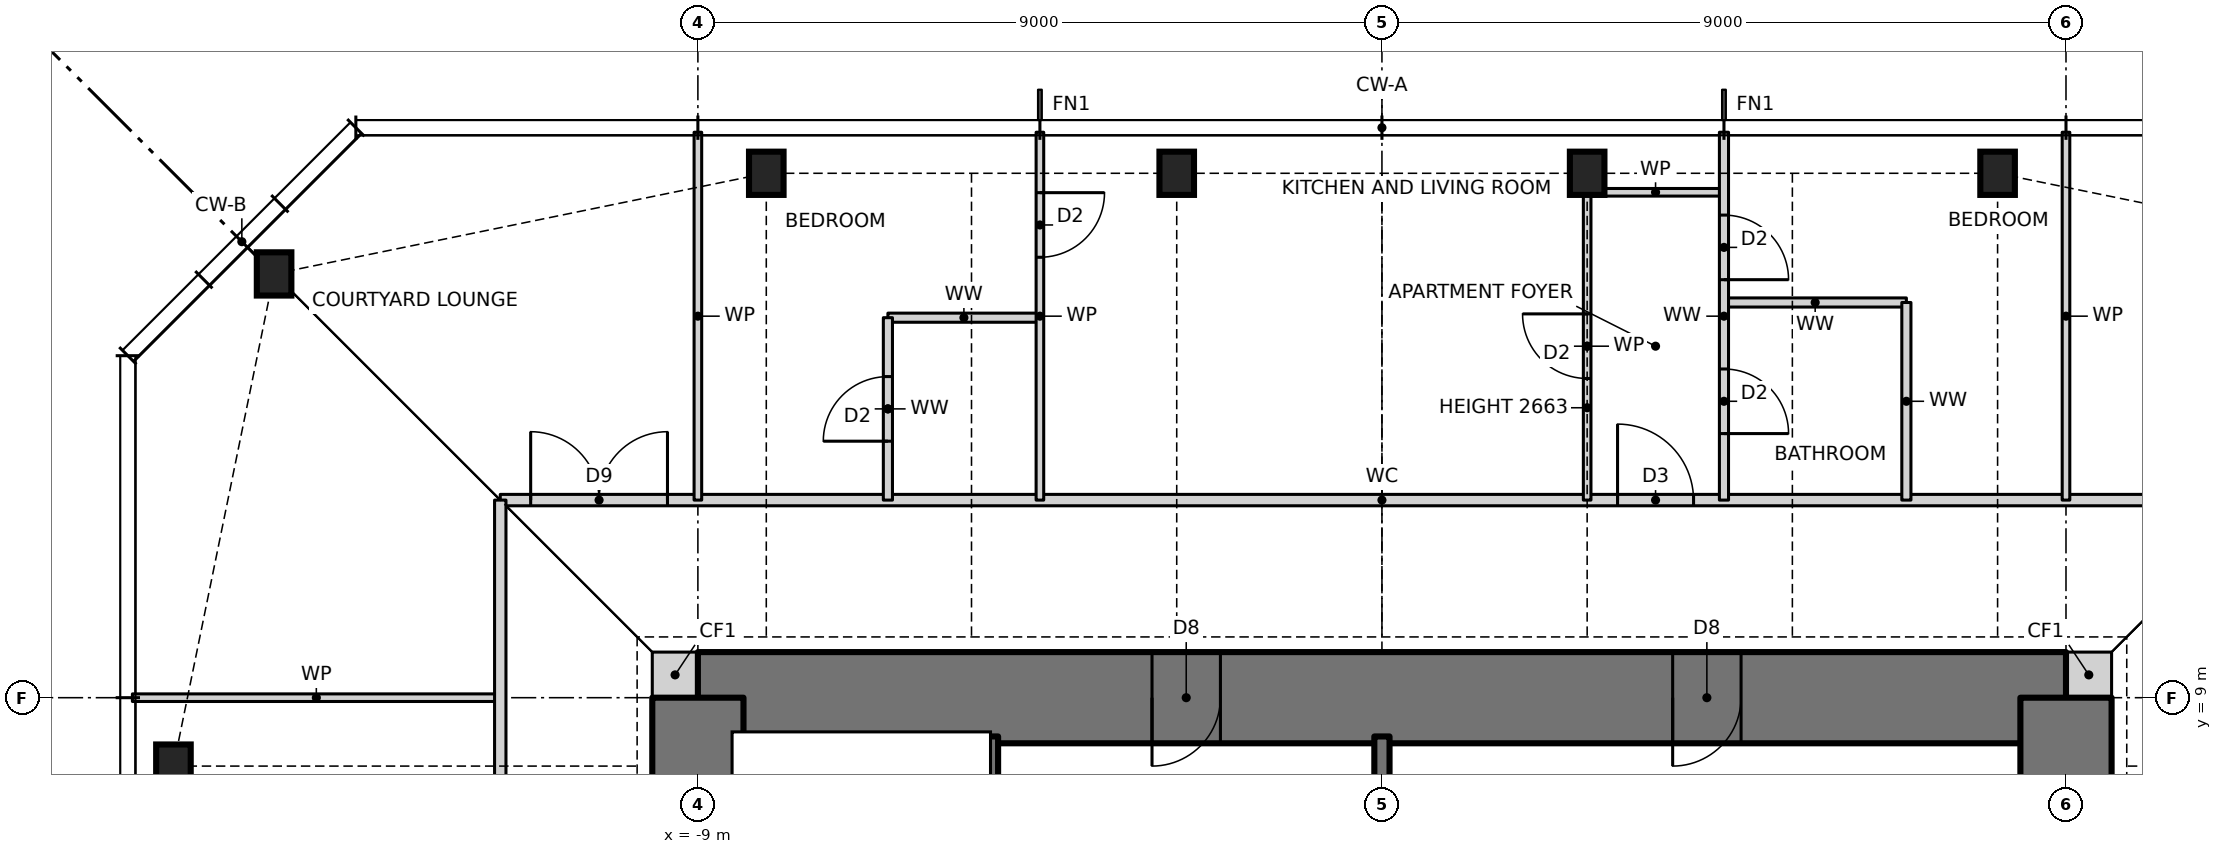
"""IFC4 building model, lengths in metres.
Left out: names, types, materials, properties, quantities, classifications, styles, units other than length and angle.
Written with IfcOpenShell. Run it as: python <this file> out.ifc"""

import sys

from ifc_helpers import new_model, si_unit, direction, frame, frame_2d, origin, origin_2d, place, context, subcontext, project, spatial, rectangle, i_section, extrude, element, fill, save


model = new_model("IFC4")
c1 = context("Model", 3, precision=1e-05, world=origin(), true_north=direction((0.0, 1.0)))
c2 = subcontext(c1, "Body", "Model", "MODEL_VIEW")
j1 = project(units=[si_unit("LENGTHUNIT", "METRE"), si_unit("PLANEANGLEUNIT", "RADIAN")], contexts=[c1])
p1 = place(None, origin())
s1 = spatial("IfcSite", under=j1, at=p1, CompositionType="ELEMENT")
p2 = place(p1, origin())
s2 = spatial("IfcBuilding", under=s1, at=p2, CompositionType="ELEMENT")
p3 = place(p2, frame((0.0, 0.0, 243.0)))
s3 = spatial("IfcBuildingStorey", under=s2, at=p3, CompositionType="ELEMENT", Elevation=243.0)
for number, where, z_axis, x_axis in (
    (1, (8.1, 15.9, 0.0), (0.0, 0.0, 1.0), (1.0, 0.0, 0.0)),
    (2, (2.7, 15.9, 0.0), (0.0, 0.0, 1.0), (1.0, 0.0, 0.0)),
    (3, (-2.7, 15.9, 0.0), (0.0, 0.0, 1.0), (1.0, 0.0, 0.0)),
    (4, (-8.1, 15.9, 0.0), (0.0, 0.0, 1.0), (1.0, 0.0, 0.0)),
    (5, (-14.576, 14.576, 0.0), (0.0, 0.0, 1.0), (1.0, 0.0, 0.0)),
    (6, (-15.9, 8.1, 0.0), (0.0, 0.0, 1.0), (1.0, 0.0, 0.0)),
):
    element("IfcColumn", number, at=place(p3, frame(where, z_axis=z_axis, x_axis=x_axis)), inside=s3, PredefinedType="COLUMN", context=c2, shape_type="SweptSolid", body=[
        extrude(i_section(OverallWidth=0.455, OverallDepth=0.569, WebThickness=0.078, FlangeThickness=0.125, at=origin_2d()), origin(), (0.0, 0.0, 1.0), 3.5),
    ])
for number, where, z_axis, x_axis in (
    (7, (9.0, 9.3, 0.0), (0.0, 0.0, 1.0), (1.0, 0.0, 0.0)),
    (8, (-9.6, 9.3, 0.0), (0.0, 0.0, 1.0), (1.0, 0.0, 0.0)),
):
    element("IfcWall", number, at=place(p3, frame(where, z_axis=z_axis, x_axis=x_axis)), inside=s3, PredefinedType="SOLIDWALL", context=c2, shape_type="SweptSolid", body=[
        extrude(rectangle(XDim=0.6, YDim=0.6, at=frame_2d((0.3, 0.0))), origin(), (0.0, 0.0, 1.0), 3.5),
    ])
p4 = place(p3, frame((9.0, 9.0, 0.0), z_axis=(0.0, 0.0, 1.0), x_axis=(-1.0, 0.0, 0.0)))
e9 = element("IfcWall", 9, at=p4, inside=s3, PredefinedType="SHEAR", context=c2, shape_type="SweptSolid", body=[
    extrude(rectangle(XDim=18.0, YDim=1.2, at=frame_2d((9.0, 0.0))), origin(), (0.0, 0.0, 1.0), 3.5),
])
p5 = place(p4, frame((11.125, 0.0, 0.0)))
e10 = element("IfcOpeningElement", 10, at=p5, cuts=e9, PredefinedType="OPENING", context=c2, shape_type="SweptSolid", body=[
    extrude(rectangle(XDim=0.9, YDim=2.1, at=frame_2d((0.45, 1.05))), frame((0.0, 0.61, 0.0), z_axis=(0.0, -1.0, 0.0), x_axis=(1.0, 0.0, 0.0)), (0.0, 0.0, 1.0), 1.22),
])
p6 = place(p4, frame((4.275, 0.0, 0.0)))
e11 = element("IfcOpeningElement", 11, at=p6, cuts=e9, PredefinedType="OPENING", context=c2, shape_type="SweptSolid", body=[
    extrude(rectangle(XDim=0.9, YDim=2.1, at=frame_2d((0.45, 1.05))), frame((0.0, 0.61, 0.0), z_axis=(0.0, -1.0, 0.0), x_axis=(1.0, 0.0, 0.0)), (0.0, 0.0, 1.0), 1.22),
])
p7 = place(p3, frame((9.0, -9.0, 0.0), z_axis=(0.0, 0.0, 1.0), x_axis=(0.0, 1.0, 0.0)))
e12 = element("IfcWall", 12, at=p7, inside=s3, PredefinedType="SHEAR", context=c2, shape_type="SweptSolid", body=[
    extrude(rectangle(XDim=18.0, YDim=1.2, at=frame_2d((9.0, 0.0))), origin(), (0.0, 0.0, 1.0), 3.5),
])
p8 = place(p7, frame((8.5, 0.0, 0.0)))
e13 = element("IfcOpeningElement", 13, at=p8, cuts=e12, PredefinedType="OPENING", context=c2, shape_type="SweptSolid", body=[
    extrude(rectangle(XDim=1.0, YDim=2.1, at=frame_2d((0.5, 1.05))), frame((0.0, 0.61, 0.0), z_axis=(0.0, -1.0, 0.0), x_axis=(1.0, 0.0, 0.0)), (0.0, 0.0, 1.0), 1.22),
])
p9 = place(p3, frame((-9.0, 9.0, 0.0), z_axis=(0.0, 0.0, 1.0), x_axis=(0.0, -1.0, 0.0)))
e14 = element("IfcWall", 14, at=p9, inside=s3, PredefinedType="SHEAR", context=c2, shape_type="SweptSolid", body=[
    extrude(rectangle(XDim=18.0, YDim=1.2, at=frame_2d((9.0, 0.0))), origin(), (0.0, 0.0, 1.0), 3.5),
])
p10 = place(p9, frame((8.5, 0.0, 0.0)))
e15 = element("IfcOpeningElement", 15, at=p10, cuts=e14, PredefinedType="OPENING", context=c2, shape_type="SweptSolid", body=[
    extrude(rectangle(XDim=1.0, YDim=2.1, at=frame_2d((0.5, 1.05))), frame((0.0, 0.61, 0.0), z_axis=(0.0, -1.0, 0.0), x_axis=(1.0, 0.0, 0.0)), (0.0, 0.0, 1.0), 1.22),
])
p11 = place(p3, frame((-16.44, 9.0, 0.0), z_axis=(0.0, 0.0, 1.0), x_axis=(1.0, 0.0, 0.0)))
e16 = element("IfcWall", 16, at=p11, inside=s3, PredefinedType="PARTITIONING", context=c2, shape_type="SweptSolid", body=[
    extrude(rectangle(XDim=4.84, YDim=0.1, at=frame_2d((2.42, 0.0))), origin(), (0.0, 0.0, 1.0), 3.27),
])
p12 = place(p3, frame((-11.6, 11.6, 0.0), z_axis=(0.0, 0.0, 1.0), x_axis=(1.0, 0.0, 0.0)))
e17 = element("IfcWall", 17, at=p12, inside=s3, PredefinedType="PARTITIONING", context=c2, shape_type="SweptSolid", body=[
    extrude(rectangle(XDim=23.2, YDim=0.15, at=frame_2d((11.6, 0.0))), origin(), (0.0, 0.0, 1.0), 3.27),
])
p13 = place(p12, frame((14.7, 0.0, 0.0)))
e18 = element("IfcOpeningElement", 18, at=p13, cuts=e17, PredefinedType="OPENING", context=c2, shape_type="SweptSolid", body=[
    extrude(rectangle(XDim=1.0, YDim=2.1, at=frame_2d((0.5, 1.05))), frame((0.0, 0.085, 0.0), z_axis=(0.0, -1.0, 0.0), x_axis=(1.0, 0.0, 0.0)), (0.0, 0.0, 1.0), 0.17),
])
p14 = place(p12, frame((0.4, 0.0, 0.0)))
e19 = element("IfcOpeningElement", 19, at=p14, cuts=e17, PredefinedType="OPENING", context=c2, shape_type="SweptSolid", body=[
    extrude(rectangle(XDim=1.8, YDim=2.1, at=frame_2d((0.9, 1.05))), frame((0.0, 0.085, 0.0), z_axis=(0.0, -1.0, 0.0), x_axis=(1.0, 0.0, 0.0)), (0.0, 0.0, 1.0), 0.17),
])
p15 = place(p3, frame((-6.5, 14.0, 0.0), z_axis=(0.0, 0.0, 1.0), x_axis=(1.0, 0.0, 0.0)))
e20 = element("IfcWall", 20, at=p15, inside=s3, PredefinedType="PARTITIONING", context=c2, shape_type="SweptSolid", body=[
    extrude(rectangle(XDim=2.0, YDim=0.12, at=frame_2d((1.0, 0.0))), origin(), (0.0, 0.0, 1.0), 3.27),
])
p16 = place(p3, frame((4.5, 14.2, 0.0), z_axis=(0.0, 0.0, 1.0), x_axis=(1.0, 0.0, 0.0)))
e21 = element("IfcWall", 21, at=p16, inside=s3, PredefinedType="PARTITIONING", context=c2, shape_type="SweptSolid", body=[
    extrude(rectangle(XDim=2.4, YDim=0.12, at=frame_2d((1.2, 0.0))), origin(), (0.0, 0.0, 1.0), 3.27),
])
p17 = place(p3, frame((2.7, 15.65, 0.0), z_axis=(0.0, 0.0, 1.0), x_axis=(1.0, 0.0, 0.0)))
e22 = element("IfcWall", 22, at=p17, inside=s3, PredefinedType="PARTITIONING", context=c2, shape_type="SweptSolid", body=[
    extrude(rectangle(XDim=1.8, YDim=0.1, at=frame_2d((0.9, 0.0))), origin(), (0.0, 0.0, 1.0), 3.27),
])
p18 = place(p3, frame((9.0, 11.6, 0.0), z_axis=(0.0, 0.0, 1.0), x_axis=(0.0, 1.0, 0.0)))
e23 = element("IfcWall", 23, at=p18, inside=s3, PredefinedType="PARTITIONING", context=c2, shape_type="SweptSolid", body=[
    extrude(rectangle(XDim=4.84, YDim=0.1, at=frame_2d((2.42, 0.0))), origin(), (0.0, 0.0, 1.0), 3.27),
])
p19 = place(p3, frame((6.9, 11.6, 0.0), z_axis=(0.0, 0.0, 1.0), x_axis=(0.0, 1.0, 0.0)))
e24 = element("IfcWall", 24, at=p19, inside=s3, PredefinedType="PARTITIONING", context=c2, shape_type="SweptSolid", body=[
    extrude(rectangle(XDim=2.6, YDim=0.12, at=frame_2d((1.3, 0.0))), origin(), (0.0, 0.0, 1.0), 3.27),
])
p20 = place(p3, frame((4.5, 11.6, 0.0), z_axis=(0.0, 0.0, 1.0), x_axis=(0.0, 1.0, 0.0)))
e25 = element("IfcWall", 25, at=p20, inside=s3, PredefinedType="PARTITIONING", context=c2, shape_type="SweptSolid", body=[
    extrude(rectangle(XDim=4.84, YDim=0.12, at=frame_2d((2.42, 0.0))), origin(), (0.0, 0.0, 1.0), 3.27),
])
p21 = place(p20, frame((2.9, 0.0, 0.0)))
e26 = element("IfcOpeningElement", 26, at=p21, cuts=e25, PredefinedType="OPENING", context=c2, shape_type="SweptSolid", body=[
    extrude(rectangle(XDim=0.85, YDim=2.1, at=frame_2d((0.425, 1.05))), frame((0.0, 0.07, 0.0), z_axis=(0.0, -1.0, 0.0), x_axis=(1.0, 0.0, 0.0)), (0.0, 0.0, 1.0), 0.14),
])
p22 = place(p20, frame((0.875, 0.0, 0.0)))
e27 = element("IfcOpeningElement", 27, at=p22, cuts=e25, PredefinedType="OPENING", context=c2, shape_type="SweptSolid", body=[
    extrude(rectangle(XDim=0.85, YDim=2.1, at=frame_2d((0.425, 1.05))), frame((0.0, 0.07, 0.0), z_axis=(0.0, -1.0, 0.0), x_axis=(1.0, 0.0, 0.0)), (0.0, 0.0, 1.0), 0.14),
])
p23 = place(p3, frame((2.7, 11.6, 0.0), z_axis=(0.0, 0.0, 1.0), x_axis=(0.0, 1.0, 0.0)))
e28 = element("IfcWall", 28, at=p23, inside=s3, PredefinedType="PARTITIONING", context=c2, shape_type="SweptSolid", body=[
    extrude(rectangle(XDim=4.05, YDim=0.1, at=frame_2d((2.025, 0.0))), origin(), (0.0, 0.0, 1.0), 2.663),
])
p24 = place(p23, frame((1.6, 0.0, 0.0)))
e29 = element("IfcOpeningElement", 29, at=p24, cuts=e28, PredefinedType="OPENING", context=c2, shape_type="SweptSolid", body=[
    extrude(rectangle(XDim=0.85, YDim=2.1, at=frame_2d((0.425, 1.05))), frame((0.0, 0.06, 0.0), z_axis=(0.0, -1.0, 0.0), x_axis=(1.0, 0.0, 0.0)), (0.0, 0.0, 1.0), 0.12),
])
p25 = place(p3, frame((0.0, 4.4, 0.0), z_axis=(0.0, 0.0, 1.0), x_axis=(0.0, 1.0, 0.0)))
e30 = element("IfcWall", 30, at=p25, inside=s3, PredefinedType="SOLIDWALL", context=c2, shape_type="SweptSolid", body=[
    extrude(rectangle(XDim=4.09, YDim=0.2, at=frame_2d((2.045, 0.0))), origin(), (0.0, 0.0, 1.0), 3.5),
])
p26 = place(p3, frame((-4.5, 11.6, 0.0), z_axis=(0.0, 0.0, 1.0), x_axis=(0.0, 1.0, 0.0)))
e31 = element("IfcWall", 31, at=p26, inside=s3, PredefinedType="PARTITIONING", context=c2, shape_type="SweptSolid", body=[
    extrude(rectangle(XDim=4.84, YDim=0.1, at=frame_2d((2.42, 0.0))), origin(), (0.0, 0.0, 1.0), 3.27),
])
p27 = place(p26, frame((3.195, 0.0, 0.0)))
e32 = element("IfcOpeningElement", 32, at=p27, cuts=e31, PredefinedType="OPENING", context=c2, shape_type="SweptSolid", body=[
    extrude(rectangle(XDim=0.85, YDim=2.1, at=frame_2d((0.425, 1.05))), frame((0.0, 0.06, 0.0), z_axis=(0.0, -1.0, 0.0), x_axis=(1.0, 0.0, 0.0)), (0.0, 0.0, 1.0), 0.12),
])
p28 = place(p3, frame((-5.15, 1.6, 0.0), z_axis=(0.0, 0.0, 1.0), x_axis=(0.0, 1.0, 0.0)))
e33 = element("IfcWall", 33, at=p28, inside=s3, PredefinedType="SOLIDWALL", context=c2, shape_type="SweptSolid", body=[
    extrude(rectangle(XDim=6.89, YDim=0.2, at=frame_2d((3.445, 0.0))), origin(), (0.0, 0.0, 1.0), 3.5),
])
p29 = place(p3, frame((-6.5, 11.6, 0.0), z_axis=(0.0, 0.0, 1.0), x_axis=(0.0, 1.0, 0.0)))
e34 = element("IfcWall", 34, at=p29, inside=s3, PredefinedType="PARTITIONING", context=c2, shape_type="SweptSolid", body=[
    extrude(rectangle(XDim=2.4, YDim=0.12, at=frame_2d((1.2, 0.0))), origin(), (0.0, 0.0, 1.0), 3.27),
])
p30 = place(p29, frame((0.775, 0.0, 0.0)))
e35 = element("IfcOpeningElement", 35, at=p30, cuts=e34, PredefinedType="OPENING", context=c2, shape_type="SweptSolid", body=[
    extrude(rectangle(XDim=0.85, YDim=2.1, at=frame_2d((0.425, 1.05))), frame((0.0, 0.07, 0.0), z_axis=(0.0, -1.0, 0.0), x_axis=(1.0, 0.0, 0.0)), (0.0, 0.0, 1.0), 0.14),
])
p31 = place(p3, frame((-9.0, 11.6, 0.0), z_axis=(0.0, 0.0, 1.0), x_axis=(0.0, 1.0, 0.0)))
e36 = element("IfcWall", 36, at=p31, inside=s3, PredefinedType="PARTITIONING", context=c2, shape_type="SweptSolid", body=[
    extrude(rectangle(XDim=4.84, YDim=0.1, at=frame_2d((2.42, 0.0))), origin(), (0.0, 0.0, 1.0), 3.27),
])
p32 = place(p3, frame((-11.6, -11.6, 0.0), z_axis=(0.0, 0.0, 1.0), x_axis=(0.0, 1.0, 0.0)))
e37 = element("IfcWall", 37, at=p32, inside=s3, PredefinedType="PARTITIONING", context=c2, shape_type="SweptSolid", body=[
    extrude(rectangle(XDim=23.2, YDim=0.15, at=frame_2d((11.6, 0.0))), origin(), (0.0, 0.0, 1.0), 3.27),
])
p33 = place(p32, frame((14.7, 0.0, 0.0)))
e38 = element("IfcOpeningElement", 38, at=p33, cuts=e37, PredefinedType="OPENING", context=c2, shape_type="SweptSolid", body=[
    extrude(rectangle(XDim=1.0, YDim=2.1, at=frame_2d((0.5, 1.05))), frame((0.0, 0.085, 0.0), z_axis=(0.0, -1.0, 0.0), x_axis=(1.0, 0.0, 0.0)), (0.0, 0.0, 1.0), 0.17),
])
p34 = place(p32, frame((0.875, 0.0, 0.0)))
e39 = element("IfcOpeningElement", 39, at=p34, cuts=e37, PredefinedType="OPENING", context=c2, shape_type="SweptSolid", body=[
    extrude(rectangle(XDim=0.85, YDim=2.1, at=frame_2d((0.425, 1.05))), frame((0.0, 0.085, 0.0), z_axis=(0.0, -1.0, 0.0), x_axis=(1.0, 0.0, 0.0)), (0.0, 0.0, 1.0), 0.17),
])
p35 = place(p13, origin())
e40 = element("IfcDoor", 40, at=p35, inside=s3, OperationType="SINGLE_SWING_LEFT", PredefinedType="DOOR", context=c2, shape_type="SweptSolid", body=[
    extrude(rectangle(XDim=1.0, YDim=2.1, at=frame_2d((0.5, 1.05))), frame((0.0, 0.025, 0.0), z_axis=(0.0, -1.0, 0.0), x_axis=(1.0, 0.0, 0.0)), (0.0, 0.0, 1.0), 0.05),
])
fill(e18, e40)
p36 = place(p24, origin())
e41 = element("IfcDoor", 41, at=p36, inside=s3, OperationType="SINGLE_SWING_RIGHT", PredefinedType="DOOR", context=c2, shape_type="SweptSolid", body=[
    extrude(rectangle(XDim=0.85, YDim=2.1, at=frame_2d((0.425, 1.05))), frame((0.0, 0.025, 0.0), z_axis=(0.0, -1.0, 0.0), x_axis=(1.0, 0.0, 0.0)), (0.0, 0.0, 1.0), 0.05),
])
fill(e29, e41)
p37 = place(p21, frame((0.85, 0.0, 0.0), z_axis=(0.0, 0.0, 1.0), x_axis=(-1.0, 0.0, 0.0)))
e42 = element("IfcDoor", 42, at=p37, inside=s3, OperationType="SINGLE_SWING_RIGHT", PredefinedType="DOOR", context=c2, shape_type="SweptSolid", body=[
    extrude(rectangle(XDim=0.85, YDim=2.1, at=frame_2d((0.425, 1.05))), frame((0.0, 0.025, 0.0), z_axis=(0.0, -1.0, 0.0), x_axis=(1.0, 0.0, 0.0)), (0.0, 0.0, 1.0), 0.05),
])
fill(e26, e42)
p38 = place(p22, frame((0.85, 0.0, 0.0), z_axis=(0.0, 0.0, 1.0), x_axis=(-1.0, 0.0, 0.0)))
e43 = element("IfcDoor", 43, at=p38, inside=s3, OperationType="SINGLE_SWING_RIGHT", PredefinedType="DOOR", context=c2, shape_type="SweptSolid", body=[
    extrude(rectangle(XDim=0.85, YDim=2.1, at=frame_2d((0.425, 1.05))), frame((0.0, 0.025, 0.0), z_axis=(0.0, -1.0, 0.0), x_axis=(1.0, 0.0, 0.0)), (0.0, 0.0, 1.0), 0.05),
])
fill(e27, e43)
p39 = place(p27, frame((0.85, 0.0, 0.0), z_axis=(0.0, 0.0, 1.0), x_axis=(-1.0, 0.0, 0.0)))
e44 = element("IfcDoor", 44, at=p39, inside=s3, OperationType="SINGLE_SWING_LEFT", PredefinedType="DOOR", context=c2, shape_type="SweptSolid", body=[
    extrude(rectangle(XDim=0.85, YDim=2.1, at=frame_2d((0.425, 1.05))), frame((0.0, 0.025, 0.0), z_axis=(0.0, -1.0, 0.0), x_axis=(1.0, 0.0, 0.0)), (0.0, 0.0, 1.0), 0.05),
])
fill(e32, e44)
p40 = place(p30, origin())
e45 = element("IfcDoor", 45, at=p40, inside=s3, OperationType="SINGLE_SWING_LEFT", PredefinedType="DOOR", context=c2, shape_type="SweptSolid", body=[
    extrude(rectangle(XDim=0.85, YDim=2.1, at=frame_2d((0.425, 1.05))), frame((0.0, 0.025, 0.0), z_axis=(0.0, -1.0, 0.0), x_axis=(1.0, 0.0, 0.0)), (0.0, 0.0, 1.0), 0.05),
])
fill(e35, e45)
p41 = place(p14, origin())
e46 = element("IfcDoor", 46, at=p41, inside=s3, OperationType="DOUBLE_DOOR_SINGLE_SWING", PredefinedType="DOOR", context=c2, shape_type="SweptSolid", body=[
    extrude(rectangle(XDim=1.8, YDim=2.1, at=frame_2d((0.9, 1.05))), frame((0.0, 0.025, 0.0), z_axis=(0.0, -1.0, 0.0), x_axis=(1.0, 0.0, 0.0)), (0.0, 0.0, 1.0), 0.05),
])
fill(e19, e46)
p42 = place(p5, origin())
e47 = element("IfcDoor", 47, at=p42, inside=s3, OperationType="SINGLE_SWING_RIGHT", PredefinedType="DOOR", context=c2, shape_type="SweptSolid", body=[
    extrude(rectangle(XDim=0.9, YDim=2.1, at=frame_2d((0.45, 1.05))), frame((0.0, 0.025, 0.0), z_axis=(0.0, -1.0, 0.0), x_axis=(1.0, 0.0, 0.0)), (0.0, 0.0, 1.0), 0.05),
])
fill(e10, e47)
p43 = place(p6, origin())
e48 = element("IfcDoor", 48, at=p43, inside=s3, OperationType="SINGLE_SWING_RIGHT", PredefinedType="DOOR", context=c2, shape_type="SweptSolid", body=[
    extrude(rectangle(XDim=0.9, YDim=2.1, at=frame_2d((0.45, 1.05))), frame((0.0, 0.025, 0.0), z_axis=(0.0, -1.0, 0.0), x_axis=(1.0, 0.0, 0.0)), (0.0, 0.0, 1.0), 0.05),
])
fill(e11, e48)
save(model, sys.argv[1])
